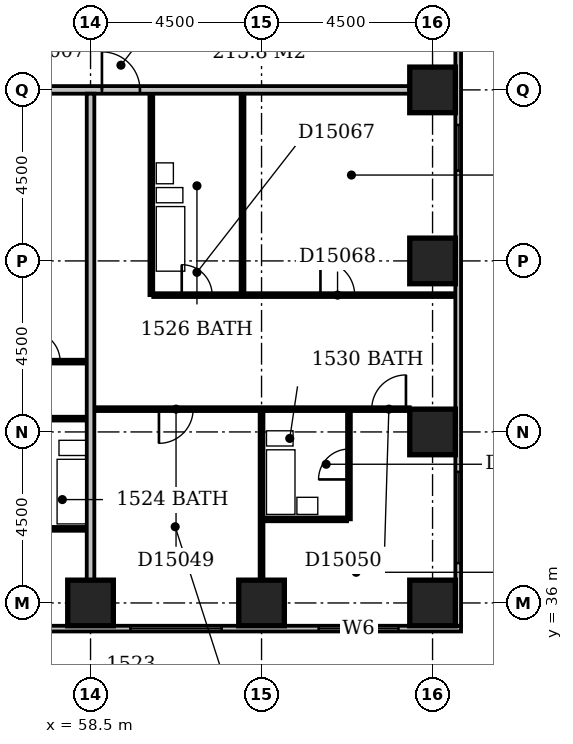
"""IFC4 building model, lengths in metres.
Left out: names, types, materials, properties, quantities, classifications, styles, units other than length and angle.
Written with IfcOpenShell. Run it as: python <this file> out.ifc"""

import sys

from ifc_helpers import new_model, si_unit, direction, frame, frame_2d, origin, origin_2d, place, context, subcontext, project, spatial, rectangle, extrude, element, fill, save


model = new_model("IFC4")
c1 = context("Model", 3, precision=1e-05, world=origin(), true_north=direction((0.0, 1.0)))
c2 = subcontext(c1, "Body", "Model", "MODEL_VIEW")
j1 = project(units=[si_unit("LENGTHUNIT", "METRE"), si_unit("PLANEANGLEUNIT", "RADIAN")], contexts=[c1])
p1 = place(None, origin())
s1 = spatial("IfcSite", under=j1, at=p1, CompositionType="ELEMENT")
p2 = place(p1, origin())
s2 = spatial("IfcBuilding", under=s1, at=p2, CompositionType="ELEMENT")
p3 = place(p2, frame((0.0, 0.0, 65.0)))
s3 = spatial("IfcBuildingStorey", under=s2, at=p3, CompositionType="ELEMENT", Elevation=65.0)
for number, where, z_axis, x_axis in (
    (1, (58.5, 36.0, -0.3), (0.0, 0.0, 1.0), (1.0, 0.0, 0.0)),
    (2, (63.0, 36.0, -0.3), (0.0, 0.0, 1.0), (1.0, 0.0, 0.0)),
    (3, (67.5, 36.0, -0.3), (0.0, 0.0, 1.0), (1.0, 0.0, 0.0)),
    (4, (67.5, 40.5, -0.3), (0.0, 0.0, 1.0), (1.0, 0.0, 0.0)),
    (5, (67.5, 45.0, -0.3), (0.0, 0.0, 1.0), (1.0, 0.0, 0.0)),
    (6, (67.5, 49.5, -0.3), (0.0, 0.0, 1.0), (1.0, 0.0, 0.0)),
):
    element("IfcColumn", number, at=place(p3, frame(where, z_axis=z_axis, x_axis=x_axis)), inside=s3, PredefinedType="COLUMN", context=c2, shape_type="SweptSolid", body=[
        extrude(rectangle(XDim=1.2, YDim=1.2, at=origin_2d()), origin(), (0.0, 0.0, 1.0), 3.6),
    ])
p4 = place(p3, frame((23.1, 35.325, 0.0), z_axis=(0.0, 0.0, 1.0), x_axis=(1.0, 0.0, 0.0)))
e7 = element("IfcWall", 7, at=p4, inside=s3, PredefinedType="STANDARD", context=c2, shape_type="SweptSolid", body=[
    extrude(rectangle(XDim=45.15, YDim=0.15, at=frame_2d((22.575, 0.0))), origin(), (0.0, 0.0, 1.0), 2.7),
])
p5 = place(p4, frame((0.45, 0.0, 0.6)))
e8 = element("IfcOpeningElement", 8, at=p5, cuts=e7, PredefinedType="OPENING", context=c2, shape_type="SweptSolid", body=[
    extrude(rectangle(XDim=2.4, YDim=1.8, at=frame_2d((1.2, 0.9))), frame((0.0, 0.087, 0.0), z_axis=(0.0, -1.0, 0.0), x_axis=(1.0, 0.0, 0.0)), (0.0, 0.0, 1.0), 0.174),
])
p6 = place(p4, frame((4.95, 0.0, 0.6)))
e9 = element("IfcOpeningElement", 9, at=p6, cuts=e7, PredefinedType="OPENING", context=c2, shape_type="SweptSolid", body=[
    extrude(rectangle(XDim=2.4, YDim=1.8, at=frame_2d((1.2, 0.9))), frame((0.0, 0.087, 0.0), z_axis=(0.0, -1.0, 0.0), x_axis=(1.0, 0.0, 0.0)), (0.0, 0.0, 1.0), 0.174),
])
p7 = place(p4, frame((10.877, 0.0, 0.6)))
e10 = element("IfcOpeningElement", 10, at=p7, cuts=e7, PredefinedType="OPENING", context=c2, shape_type="SweptSolid", body=[
    extrude(rectangle(XDim=1.2, YDim=1.8, at=frame_2d((0.6, 0.9))), frame((0.0, 0.087, 0.0), z_axis=(0.0, -1.0, 0.0), x_axis=(1.0, 0.0, 0.0)), (0.0, 0.0, 1.0), 0.174),
])
p8 = place(p4, frame((13.823, 0.0, 0.6)))
e11 = element("IfcOpeningElement", 11, at=p8, cuts=e7, PredefinedType="OPENING", context=c2, shape_type="SweptSolid", body=[
    extrude(rectangle(XDim=1.2, YDim=1.8, at=frame_2d((0.6, 0.9))), frame((0.0, 0.087, 0.0), z_axis=(0.0, -1.0, 0.0), x_axis=(1.0, 0.0, 0.0)), (0.0, 0.0, 1.0), 0.174),
])
p9 = place(p4, frame((18.45, 0.0, 0.6)))
e12 = element("IfcOpeningElement", 12, at=p9, cuts=e7, PredefinedType="OPENING", context=c2, shape_type="SweptSolid", body=[
    extrude(rectangle(XDim=2.4, YDim=1.8, at=frame_2d((1.2, 0.9))), frame((0.0, 0.087, 0.0), z_axis=(0.0, -1.0, 0.0), x_axis=(1.0, 0.0, 0.0)), (0.0, 0.0, 1.0), 0.174),
])
p10 = place(p4, frame((22.95, 0.0, 0.6)))
e13 = element("IfcOpeningElement", 13, at=p10, cuts=e7, PredefinedType="OPENING", context=c2, shape_type="SweptSolid", body=[
    extrude(rectangle(XDim=2.4, YDim=1.8, at=frame_2d((1.2, 0.9))), frame((0.0, 0.087, 0.0), z_axis=(0.0, -1.0, 0.0), x_axis=(1.0, 0.0, 0.0)), (0.0, 0.0, 1.0), 0.174),
])
p11 = place(p4, frame((27.45, 0.0, 0.6)))
e14 = element("IfcOpeningElement", 14, at=p11, cuts=e7, PredefinedType="OPENING", context=c2, shape_type="SweptSolid", body=[
    extrude(rectangle(XDim=2.4, YDim=1.8, at=frame_2d((1.2, 0.9))), frame((0.0, 0.087, 0.0), z_axis=(0.0, -1.0, 0.0), x_axis=(1.0, 0.0, 0.0)), (0.0, 0.0, 1.0), 0.174),
])
p12 = place(p4, frame((31.95, 0.0, 0.6)))
e15 = element("IfcOpeningElement", 15, at=p12, cuts=e7, PredefinedType="OPENING", context=c2, shape_type="SweptSolid", body=[
    extrude(rectangle(XDim=2.4, YDim=1.8, at=frame_2d((1.2, 0.9))), frame((0.0, 0.087, 0.0), z_axis=(0.0, -1.0, 0.0), x_axis=(1.0, 0.0, 0.0)), (0.0, 0.0, 1.0), 0.174),
])
p13 = place(p4, frame((36.45, 0.0, 0.6)))
e16 = element("IfcOpeningElement", 16, at=p13, cuts=e7, PredefinedType="OPENING", context=c2, shape_type="SweptSolid", body=[
    extrude(rectangle(XDim=2.4, YDim=1.8, at=frame_2d((1.2, 0.9))), frame((0.0, 0.087, 0.0), z_axis=(0.0, -1.0, 0.0), x_axis=(1.0, 0.0, 0.0)), (0.0, 0.0, 1.0), 0.174),
])
p14 = place(p4, frame((41.403, 0.0, 0.6)))
e17 = element("IfcOpeningElement", 17, at=p14, cuts=e7, PredefinedType="OPENING", context=c2, shape_type="SweptSolid", body=[
    extrude(rectangle(XDim=2.1, YDim=1.8, at=frame_2d((1.05, 0.9))), frame((0.0, 0.087, 0.0), z_axis=(0.0, -1.0, 0.0), x_axis=(1.0, 0.0, 0.0)), (0.0, 0.0, 1.0), 0.174),
])
p15 = place(p3, frame((68.175, 35.4, 0.0), z_axis=(0.0, 0.0, 1.0), x_axis=(0.0, 1.0, 0.0)))
e18 = element("IfcWall", 18, at=p15, inside=s3, PredefinedType="STANDARD", context=c2, shape_type="SweptSolid", body=[
    extrude(rectangle(XDim=23.85, YDim=0.15, at=frame_2d((11.925, 0.0))), origin(), (0.0, 0.0, 1.0), 2.7),
])
p16 = place(p15, frame((1.65, 0.0, 0.6)))
e19 = element("IfcOpeningElement", 19, at=p16, cuts=e18, PredefinedType="OPENING", context=c2, shape_type="SweptSolid", body=[
    extrude(rectangle(XDim=2.4, YDim=1.8, at=frame_2d((1.2, 0.9))), frame((0.0, 0.087, 0.0), z_axis=(0.0, -1.0, 0.0), x_axis=(1.0, 0.0, 0.0)), (0.0, 0.0, 1.0), 0.174),
])
p17 = place(p15, frame((11.977, 0.0, 0.6)))
e20 = element("IfcOpeningElement", 20, at=p17, cuts=e18, PredefinedType="OPENING", context=c2, shape_type="SweptSolid", body=[
    extrude(rectangle(XDim=1.2, YDim=1.8, at=frame_2d((0.6, 0.9))), frame((0.0, 0.087, 0.0), z_axis=(0.0, -1.0, 0.0), x_axis=(1.0, 0.0, 0.0)), (0.0, 0.0, 1.0), 0.174),
])
p18 = place(p15, frame((19.65, 0.0, 0.6)))
e21 = element("IfcOpeningElement", 21, at=p18, cuts=e18, PredefinedType="OPENING", context=c2, shape_type="SweptSolid", body=[
    extrude(rectangle(XDim=2.4, YDim=1.8, at=frame_2d((1.2, 0.9))), frame((0.0, 0.087, 0.0), z_axis=(0.0, -1.0, 0.0), x_axis=(1.0, 0.0, 0.0)), (0.0, 0.0, 1.0), 0.174),
])
p19 = place(p3, frame((58.5, 36.6, 0.0), z_axis=(0.0, 0.0, 1.0), x_axis=(0.0, 1.0, 0.0)))
e22 = element("IfcWall", 22, at=p19, inside=s3, PredefinedType="PARTITIONING", context=c2, shape_type="SweptSolid", body=[
    extrude(rectangle(XDim=12.8, YDim=0.2, at=frame_2d((6.4, 0.0))), origin(), (0.0, 0.0, 1.0), 3.3),
])
p20 = place(p3, frame((63.0, 36.6, 0.0), z_axis=(0.0, 0.0, 1.0), x_axis=(0.0, 1.0, 0.0)))
e23 = element("IfcWall", 23, at=p20, inside=s3, PredefinedType="PARTITIONING", context=c2, shape_type="SweptSolid", body=[
    extrude(rectangle(XDim=4.45, YDim=0.1, at=frame_2d((2.225, 0.0))), origin(), (0.0, 0.0, 1.0), 2.4),
])
p21 = place(p3, frame((56.25, 37.95, 0.0), z_axis=(0.0, 0.0, 1.0), x_axis=(1.0, 0.0, 0.0)))
e24 = element("IfcWall", 24, at=p21, inside=s3, PredefinedType="PLUMBINGWALL", context=c2, shape_type="SweptSolid", body=[
    extrude(rectangle(XDim=2.15, YDim=0.1, at=frame_2d((1.075, 0.0))), origin(), (0.0, 0.0, 1.0), 3.3),
])
p22 = place(p3, frame((63.05, 38.2, 0.0), z_axis=(0.0, 0.0, 1.0), x_axis=(1.0, 0.0, 0.0)))
e25 = element("IfcWall", 25, at=p22, inside=s3, PredefinedType="PLUMBINGWALL", context=c2, shape_type="SweptSolid", body=[
    extrude(rectangle(XDim=2.2, YDim=0.1, at=frame_2d((1.1, 0.0))), origin(), (0.0, 0.0, 1.0), 3.3),
])
p23 = place(p3, frame((65.3, 38.2, 0.0), z_axis=(0.0, 0.0, 1.0), x_axis=(0.0, 1.0, 0.0)))
e26 = element("IfcWall", 26, at=p23, inside=s3, PredefinedType="PLUMBINGWALL", context=c2, shape_type="SweptSolid", body=[
    extrude(rectangle(XDim=2.85, YDim=0.1, at=frame_2d((1.425, 0.0))), origin(), (0.0, 0.0, 1.0), 3.3),
])
p24 = place(p23, frame((1.05, 0.0, 0.0)))
e27 = element("IfcOpeningElement", 27, at=p24, cuts=e26, PredefinedType="OPENING", context=c2, shape_type="SweptSolid", body=[
    extrude(rectangle(XDim=0.8, YDim=2.1, at=frame_2d((0.4, 1.05))), frame((0.0, 0.062, 0.0), z_axis=(0.0, -1.0, 0.0), x_axis=(1.0, 0.0, 0.0)), (0.0, 0.0, 1.0), 0.124),
])
p25 = place(p3, frame((49.6, 40.85, 0.0), z_axis=(0.0, 0.0, 1.0), x_axis=(1.0, 0.0, 0.0)))
e28 = element("IfcWall", 28, at=p25, inside=s3, PredefinedType="PARTITIONING", context=c2, shape_type="SweptSolid", body=[
    extrude(rectangle(XDim=8.8, YDim=0.1, at=frame_2d((4.4, 0.0))), origin(), (0.0, 0.0, 1.0), 3.3),
])
p26 = place(p25, frame((1.7, 0.0, 0.0)))
e29 = element("IfcOpeningElement", 29, at=p26, cuts=e28, PredefinedType="OPENING", context=c2, shape_type="SweptSolid", body=[
    extrude(rectangle(XDim=0.9, YDim=2.1, at=frame_2d((0.45, 1.05))), frame((0.0, 0.062, 0.0), z_axis=(0.0, -1.0, 0.0), x_axis=(1.0, 0.0, 0.0)), (0.0, 0.0, 1.0), 0.124),
])
p27 = place(p25, frame((5.05, 0.0, 0.0)))
e30 = element("IfcOpeningElement", 30, at=p27, cuts=e28, PredefinedType="OPENING", context=c2, shape_type="SweptSolid", body=[
    extrude(rectangle(XDim=0.9, YDim=2.1, at=frame_2d((0.45, 1.05))), frame((0.0, 0.062, 0.0), z_axis=(0.0, -1.0, 0.0), x_axis=(1.0, 0.0, 0.0)), (0.0, 0.0, 1.0), 0.124),
])
p28 = place(p3, frame((58.6, 41.1, 0.0), z_axis=(0.0, 0.0, 1.0), x_axis=(1.0, 0.0, 0.0)))
e31 = element("IfcWall", 31, at=p28, inside=s3, PredefinedType="PARTITIONING", context=c2, shape_type="SweptSolid", body=[
    extrude(rectangle(XDim=8.3, YDim=0.1, at=frame_2d((4.15, 0.0))), origin(), (0.0, 0.0, 1.0), 3.3),
])
p29 = place(p28, frame((1.7, 0.0, 0.0)))
e32 = element("IfcOpeningElement", 32, at=p29, cuts=e31, PredefinedType="OPENING", context=c2, shape_type="SweptSolid", body=[
    extrude(rectangle(XDim=0.9, YDim=2.1, at=frame_2d((0.45, 1.05))), frame((0.0, 0.062, 0.0), z_axis=(0.0, -1.0, 0.0), x_axis=(1.0, 0.0, 0.0)), (0.0, 0.0, 1.0), 0.124),
])
p30 = place(p28, frame((7.3, 0.0, 0.0)))
e33 = element("IfcOpeningElement", 33, at=p30, cuts=e31, PredefinedType="OPENING", context=c2, shape_type="SweptSolid", body=[
    extrude(rectangle(XDim=0.9, YDim=2.1, at=frame_2d((0.45, 1.05))), frame((0.0, 0.062, 0.0), z_axis=(0.0, -1.0, 0.0), x_axis=(1.0, 0.0, 0.0)), (0.0, 0.0, 1.0), 0.124),
])
p31 = place(p3, frame((56.15, 42.35, 0.0), z_axis=(0.0, 0.0, 1.0), x_axis=(1.0, 0.0, 0.0)))
e34 = element("IfcWall", 34, at=p31, inside=s3, PredefinedType="PARTITIONING", context=c2, shape_type="SweptSolid", body=[
    extrude(rectangle(XDim=2.25, YDim=0.1, at=frame_2d((1.125, 0.0))), origin(), (0.0, 0.0, 1.0), 3.3),
])
p32 = place(p31, frame((0.75, 0.0, 0.0)))
e35 = element("IfcOpeningElement", 35, at=p32, cuts=e34, PredefinedType="OPENING", context=c2, shape_type="SweptSolid", body=[
    extrude(rectangle(XDim=0.8, YDim=2.1, at=frame_2d((0.4, 1.05))), frame((0.0, 0.062, 0.0), z_axis=(0.0, -1.0, 0.0), x_axis=(1.0, 0.0, 0.0)), (0.0, 0.0, 1.0), 0.124),
])
p33 = place(p3, frame((60.1, 44.1, 0.0), z_axis=(0.0, 0.0, 1.0), x_axis=(0.0, 1.0, 0.0)))
e36 = element("IfcWall", 36, at=p33, inside=s3, PredefinedType="PLUMBINGWALL", context=c2, shape_type="SweptSolid", body=[
    extrude(rectangle(XDim=5.3, YDim=0.1, at=frame_2d((2.65, 0.0))), origin(), (0.0, 0.0, 1.0), 3.3),
])
p34 = place(p3, frame((60.15, 44.1, 0.0), z_axis=(0.0, 0.0, 1.0), x_axis=(1.0, 0.0, 0.0)))
e37 = element("IfcWall", 37, at=p34, inside=s3, PredefinedType="PARTITIONING", context=c2, shape_type="SweptSolid", body=[
    extrude(rectangle(XDim=7.95, YDim=0.1, at=frame_2d((3.975, 0.0))), origin(), (0.0, 0.0, 1.0), 3.3),
])
p35 = place(p34, frame((0.75, 0.0, 0.0)))
e38 = element("IfcOpeningElement", 38, at=p35, cuts=e37, PredefinedType="OPENING", context=c2, shape_type="SweptSolid", body=[
    extrude(rectangle(XDim=0.8, YDim=2.1, at=frame_2d((0.4, 1.05))), frame((0.0, 0.062, 0.0), z_axis=(0.0, -1.0, 0.0), x_axis=(1.0, 0.0, 0.0)), (0.0, 0.0, 1.0), 0.124),
])
p36 = place(p34, frame((4.4, 0.0, 0.0)))
e39 = element("IfcOpeningElement", 39, at=p36, cuts=e37, PredefinedType="OPENING", context=c2, shape_type="SweptSolid", body=[
    extrude(rectangle(XDim=0.9, YDim=2.1, at=frame_2d((0.45, 1.05))), frame((0.0, 0.062, 0.0), z_axis=(0.0, -1.0, 0.0), x_axis=(1.0, 0.0, 0.0)), (0.0, 0.0, 1.0), 0.124),
])
p37 = place(p3, frame((62.5, 44.15, 0.0), z_axis=(0.0, 0.0, 1.0), x_axis=(0.0, 1.0, 0.0)))
e40 = element("IfcWall", 40, at=p37, inside=s3, PredefinedType="PLUMBINGWALL", context=c2, shape_type="SweptSolid", body=[
    extrude(rectangle(XDim=5.25, YDim=0.1, at=frame_2d((2.625, 0.0))), origin(), (0.0, 0.0, 1.0), 2.4),
])
p38 = place(p3, frame((9.1, 49.5, 0.0), z_axis=(0.0, 0.0, 1.0), x_axis=(1.0, 0.0, 0.0)))
e41 = element("IfcWall", 41, at=p38, inside=s3, PredefinedType="PARTITIONING", context=c2, shape_type="SweptSolid", body=[
    extrude(rectangle(XDim=57.8, YDim=0.2, at=frame_2d((28.9, 0.0))), origin(), (0.0, 0.0, 1.0), 3.3),
])
p39 = place(p38, frame((13.7, 0.0, 0.0)))
e42 = element("IfcOpeningElement", 42, at=p39, cuts=e41, PredefinedType="OPENING", context=c2, shape_type="SweptSolid", body=[
    extrude(rectangle(XDim=1.0, YDim=2.1, at=frame_2d((0.5, 1.05))), frame((0.0, 0.112, 0.0), z_axis=(0.0, -1.0, 0.0), x_axis=(1.0, 0.0, 0.0)), (0.0, 0.0, 1.0), 0.224),
])
p40 = place(p38, frame((32.2, 0.0, 0.0)))
e43 = element("IfcOpeningElement", 43, at=p40, cuts=e41, PredefinedType="OPENING", context=c2, shape_type="SweptSolid", body=[
    extrude(rectangle(XDim=1.0, YDim=2.1, at=frame_2d((0.5, 1.05))), frame((0.0, 0.112, 0.0), z_axis=(0.0, -1.0, 0.0), x_axis=(1.0, 0.0, 0.0)), (0.0, 0.0, 1.0), 0.224),
])
p41 = place(p38, frame((37.85, 0.0, 0.0)))
e44 = element("IfcOpeningElement", 44, at=p41, cuts=e41, PredefinedType="OPENING", context=c2, shape_type="SweptSolid", body=[
    extrude(rectangle(XDim=1.0, YDim=2.1, at=frame_2d((0.5, 1.05))), frame((0.0, 0.112, 0.0), z_axis=(0.0, -1.0, 0.0), x_axis=(1.0, 0.0, 0.0)), (0.0, 0.0, 1.0), 0.224),
])
p42 = place(p38, frame((45.7, 0.0, 0.0)))
e45 = element("IfcOpeningElement", 45, at=p42, cuts=e41, PredefinedType="OPENING", context=c2, shape_type="SweptSolid", body=[
    extrude(rectangle(XDim=1.0, YDim=2.1, at=frame_2d((0.5, 1.05))), frame((0.0, 0.112, 0.0), z_axis=(0.0, -1.0, 0.0), x_axis=(1.0, 0.0, 0.0)), (0.0, 0.0, 1.0), 0.224),
])
p43 = place(p38, frame((49.7, 0.0, 0.0)))
e46 = element("IfcOpeningElement", 46, at=p43, cuts=e41, PredefinedType="OPENING", context=c2, shape_type="SweptSolid", body=[
    extrude(rectangle(XDim=1.0, YDim=2.1, at=frame_2d((0.5, 1.05))), frame((0.0, 0.112, 0.0), z_axis=(0.0, -1.0, 0.0), x_axis=(1.0, 0.0, 0.0)), (0.0, 0.0, 1.0), 0.224),
])
p44 = place(p38, frame((8.4, 0.0, 0.0)))
e47 = element("IfcOpeningElement", 47, at=p44, cuts=e41, PredefinedType="OPENING", context=c2, shape_type="SweptSolid", body=[
    extrude(rectangle(XDim=0.9, YDim=2.1, at=frame_2d((0.45, 1.05))), frame((0.0, 0.112, 0.0), z_axis=(0.0, -1.0, 0.0), x_axis=(1.0, 0.0, 0.0)), (0.0, 0.0, 1.0), 0.224),
])
p45 = place(p13, origin())
e48 = element("IfcWindow", 48, at=p45, inside=s3, PartitioningType="SINGLE_PANEL", PredefinedType="WINDOW", context=c2, shape_type="SweptSolid", body=[
    extrude(rectangle(XDim=2.4, YDim=1.8, at=frame_2d((1.2, 0.9))), frame((0.0, 0.03, 0.0), z_axis=(0.0, -1.0, 0.0), x_axis=(1.0, 0.0, 0.0)), (0.0, 0.0, 1.0), 0.06),
])
fill(e16, e48)
p46 = place(p14, origin())
e49 = element("IfcWindow", 49, at=p46, inside=s3, PartitioningType="SINGLE_PANEL", PredefinedType="WINDOW", context=c2, shape_type="SweptSolid", body=[
    extrude(rectangle(XDim=2.1, YDim=1.8, at=frame_2d((1.05, 0.9))), frame((0.0, 0.03, 0.0), z_axis=(0.0, -1.0, 0.0), x_axis=(1.0, 0.0, 0.0)), (0.0, 0.0, 1.0), 0.06),
])
fill(e17, e49)
p47 = place(p16, origin())
e50 = element("IfcWindow", 50, at=p47, inside=s3, PartitioningType="SINGLE_PANEL", PredefinedType="WINDOW", context=c2, shape_type="SweptSolid", body=[
    extrude(rectangle(XDim=2.4, YDim=1.8, at=frame_2d((1.2, 0.9))), frame((0.0, 0.03, 0.0), z_axis=(0.0, -1.0, 0.0), x_axis=(1.0, 0.0, 0.0)), (0.0, 0.0, 1.0), 0.06),
])
fill(e19, e50)
p48 = place(p17, origin())
e51 = element("IfcWindow", 51, at=p48, inside=s3, PartitioningType="SINGLE_PANEL", PredefinedType="WINDOW", context=c2, shape_type="SweptSolid", body=[
    extrude(rectangle(XDim=1.2, YDim=1.8, at=frame_2d((0.6, 0.9))), frame((0.0, 0.03, 0.0), z_axis=(0.0, -1.0, 0.0), x_axis=(1.0, 0.0, 0.0)), (0.0, 0.0, 1.0), 0.06),
])
fill(e20, e51)
p49 = place(p24, origin())
e52 = element("IfcDoor", 52, at=p49, inside=s3, OperationType="SINGLE_SWING_LEFT", PredefinedType="DOOR", context=c2, shape_type="SweptSolid", body=[
    extrude(rectangle(XDim=0.8, YDim=2.1, at=frame_2d((0.4, 1.05))), frame((0.0, 0.025, 0.0), z_axis=(0.0, -1.0, 0.0), x_axis=(1.0, 0.0, 0.0)), (0.0, 0.0, 1.0), 0.05),
])
fill(e27, e52)
p50 = place(p29, frame((0.9, 0.0, 0.0), z_axis=(0.0, 0.0, 1.0), x_axis=(-1.0, 0.0, 0.0)))
e53 = element("IfcDoor", 53, at=p50, inside=s3, OperationType="SINGLE_SWING_RIGHT", PredefinedType="DOOR", context=c2, shape_type="SweptSolid", body=[
    extrude(rectangle(XDim=0.9, YDim=2.1, at=frame_2d((0.45, 1.05))), frame((0.0, 0.025, 0.0), z_axis=(0.0, -1.0, 0.0), x_axis=(1.0, 0.0, 0.0)), (0.0, 0.0, 1.0), 0.05),
])
fill(e32, e53)
p51 = place(p30, frame((0.9, 0.0, 0.0), z_axis=(0.0, 0.0, 1.0), x_axis=(-1.0, 0.0, 0.0)))
e54 = element("IfcDoor", 54, at=p51, inside=s3, OperationType="SINGLE_SWING_LEFT", PredefinedType="DOOR", context=c2, shape_type="SweptSolid", body=[
    extrude(rectangle(XDim=0.9, YDim=2.1, at=frame_2d((0.45, 1.05))), frame((0.0, 0.025, 0.0), z_axis=(0.0, -1.0, 0.0), x_axis=(1.0, 0.0, 0.0)), (0.0, 0.0, 1.0), 0.05),
])
fill(e33, e54)
p52 = place(p32, origin())
e55 = element("IfcDoor", 55, at=p52, inside=s3, OperationType="SINGLE_SWING_LEFT", PredefinedType="DOOR", context=c2, shape_type="SweptSolid", body=[
    extrude(rectangle(XDim=0.8, YDim=2.1, at=frame_2d((0.4, 1.05))), frame((0.0, 0.025, 0.0), z_axis=(0.0, -1.0, 0.0), x_axis=(1.0, 0.0, 0.0)), (0.0, 0.0, 1.0), 0.05),
])
fill(e35, e55)
p53 = place(p35, origin())
e56 = element("IfcDoor", 56, at=p53, inside=s3, OperationType="SINGLE_SWING_LEFT", PredefinedType="DOOR", context=c2, shape_type="SweptSolid", body=[
    extrude(rectangle(XDim=0.8, YDim=2.1, at=frame_2d((0.4, 1.05))), frame((0.0, 0.025, 0.0), z_axis=(0.0, -1.0, 0.0), x_axis=(1.0, 0.0, 0.0)), (0.0, 0.0, 1.0), 0.05),
])
fill(e38, e56)
p54 = place(p36, origin())
e57 = element("IfcDoor", 57, at=p54, inside=s3, OperationType="SINGLE_SWING_LEFT", PredefinedType="DOOR", context=c2, shape_type="SweptSolid", body=[
    extrude(rectangle(XDim=0.9, YDim=2.1, at=frame_2d((0.45, 1.05))), frame((0.0, 0.025, 0.0), z_axis=(0.0, -1.0, 0.0), x_axis=(1.0, 0.0, 0.0)), (0.0, 0.0, 1.0), 0.05),
])
fill(e39, e57)
p55 = place(p43, origin())
e58 = element("IfcDoor", 58, at=p55, inside=s3, OperationType="SINGLE_SWING_LEFT", PredefinedType="DOOR", context=c2, shape_type="SweptSolid", body=[
    extrude(rectangle(XDim=1.0, YDim=2.1, at=frame_2d((0.5, 1.05))), frame((0.0, 0.025, 0.0), z_axis=(0.0, -1.0, 0.0), x_axis=(1.0, 0.0, 0.0)), (0.0, 0.0, 1.0), 0.05),
])
fill(e46, e58)
save(model, sys.argv[1])
